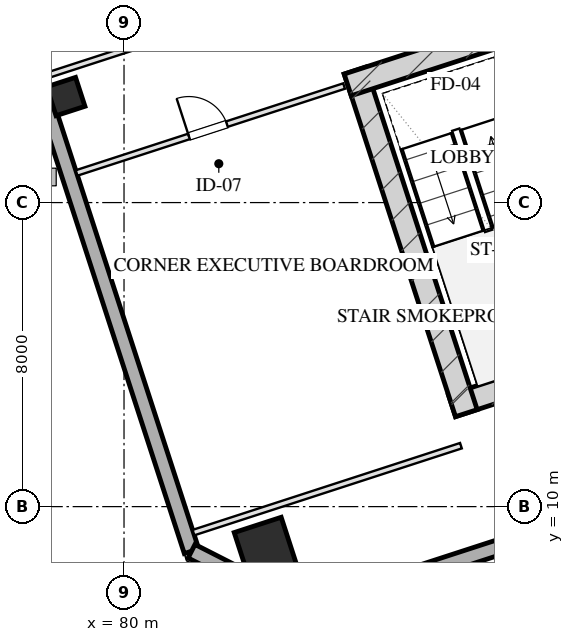
"""IFC4 building model, lengths in metres.
Left out: names, types, materials, properties, quantities, classifications, styles, units other than length and angle.
Written with IfcOpenShell. Run it as: python <this file> out.ifc"""

import sys

from ifc_helpers import new_model, si_unit, direction, frame, frame_2d, origin, origin_2d, place, context, subcontext, project, spatial, rectangle, hollow_rectangle, extrude, element, fill, save


model = new_model("IFC4")
c1 = context("Model", 3, precision=1e-05, world=origin(), true_north=direction((0.0, 1.0)))
c2 = subcontext(c1, "Body", "Model", "MODEL_VIEW")
j1 = project(units=[si_unit("LENGTHUNIT", "METRE"), si_unit("PLANEANGLEUNIT", "RADIAN")], contexts=[c1])
p1 = place(None, origin())
s1 = spatial("IfcSite", under=j1, at=p1, CompositionType="ELEMENT")
p2 = place(p1, origin())
s2 = spatial("IfcBuilding", under=s1, at=p2, CompositionType="ELEMENT")
p3 = place(p2, frame((0.0, 0.0, 163.3)))
s3 = spatial("IfcBuildingStorey", under=s2, at=p3, CompositionType="ELEMENT", Elevation=163.3)
p4 = place(p3, frame((88.63, 12.652, 0.0), z_axis=(0.0, 0.0, 1.0), x_axis=(0.95105714907, 0.309015046886, 0.0)))
e1 = element("IfcWall", 1, at=p4, inside=s3, PredefinedType="SHEAR", context=c2, shape_type="SweptSolid", body=[
    extrude(rectangle(XDim=16.4, YDim=0.6, at=frame_2d((8.2, 0.0))), origin(), (0.0, 0.0, 1.0), 3.45),
])
p5 = place(p3, frame((86.078, 21.475, 0.0), z_axis=(0.0, 0.0, 1.0), x_axis=(0.309017938678, -0.951056209472, 0.0)))
e2 = element("IfcWall", 2, at=p5, inside=s3, PredefinedType="SHEAR", context=c2, shape_type="SweptSolid", body=[
    extrude(rectangle(XDim=9.48, YDim=0.6, at=frame_2d((4.74, 0.0))), origin(), (0.0, 0.0, 1.0), 3.45),
])
p6 = place(p3, frame((85.886, 21.097, 0.0), z_axis=(0.0, 0.0, 1.0), x_axis=(0.951068073652, 0.308981422225, 0.0)))
e3 = element("IfcWall", 3, at=p6, inside=s3, PredefinedType="SHEAR", context=c2, shape_type="SweptSolid", body=[
    extrude(rectangle(XDim=4.22, YDim=0.6, at=frame_2d((2.11, 0.0))), origin(), (0.0, 0.0, 1.0), 3.45),
])
p7 = place(p3, frame((83.719, 8.901, 0.0), z_axis=(0.0, 0.0, 1.0), x_axis=(0.951056516295, 0.309016994375, 0.0)))
e4 = element("IfcColumn", 4, at=p7, inside=s3, PredefinedType="COLUMN", context=c2, shape_type="SweptSolid", body=[
    extrude(hollow_rectangle(XDim=1.3, YDim=1.3, WallThickness=0.045, at=origin_2d()), origin(), (0.0, 0.0, 1.0), 3.451),
])
p8 = place(p3, frame((78.468, 20.79, 0.0), z_axis=(0.0, 0.0, 1.0), x_axis=(0.951056516295, 0.309016994375, 0.0)))
e5 = element("IfcColumn", 5, at=p8, inside=s3, PredefinedType="COLUMN", context=c2, shape_type="SweptSolid", body=[
    extrude(hollow_rectangle(XDim=0.8, YDim=0.8, WallThickness=0.028, at=origin_2d()), origin(), (0.0, 0.0, 1.0), 3.451),
])
p9 = place(p3, frame((81.776, 8.827, 0.0), z_axis=(0.0, 0.0, 1.0), x_axis=(-0.309014228706, 0.951057414911, 0.0)))
e6 = element("IfcWall", 6, at=p9, inside=s3, PredefinedType="SOLIDWALL", context=c2, shape_type="SweptSolid", body=[
    extrude(rectangle(XDim=42.8, YDim=0.4, at=frame_2d((21.4, 0.0))), origin(), (0.0, 0.0, 1.0), 2.61),
])
p10 = place(p9, frame((23.45, 0.0, 0.0)))
e7 = element("IfcOpeningElement", 7, at=p10, cuts=e6, PredefinedType="OPENING", context=c2, shape_type="SweptSolid", body=[
    extrude(rectangle(XDim=1.1, YDim=2.15, at=frame_2d((0.55, 1.075))), frame((0.0, 0.21, 0.0), z_axis=(0.0, -1.0, 0.0), x_axis=(1.0, 0.0, 0.0)), (0.0, 0.0, 1.0), 0.42),
])
p11 = place(p3, frame((109.908, 15.444, 0.0), z_axis=(0.0, 0.0, 1.0), x_axis=(-0.951057580055, -0.30901372044, 0.0)))
e8 = element("IfcWall", 8, at=p11, inside=s3, PredefinedType="SOLIDWALL", context=c2, shape_type="SweptSolid", body=[
    extrude(rectangle(XDim=26.4, YDim=0.4, at=frame_2d((13.2, 0.0))), origin(), (0.0, 0.0, 1.0), 2.61),
])
p12 = place(p3, frame((84.801, 7.286, 0.0), z_axis=(0.0, 0.0, 1.0), x_axis=(-0.891020832027, 0.453962417932, 0.0)))
e9 = element("IfcWall", 9, at=p12, inside=s3, PredefinedType="SOLIDWALL", context=c2, shape_type="SweptSolid", body=[
    extrude(rectangle(XDim=3.394, YDim=0.4, at=frame_2d((1.697, 0.0))), origin(), (0.0, 0.0, 1.0), 2.61),
])
p13 = place(p3, frame((81.828, 9.316, 0.0), z_axis=(0.0, 0.0, 1.0), x_axis=(0.95105128112, 0.309033106124, 0.0)))
e10 = element("IfcWall", 10, at=p13, inside=s3, PredefinedType="PARTITIONING", context=c2, shape_type="SweptSolid", body=[
    extrude(rectangle(XDim=7.4, YDim=0.15, at=frame_2d((3.7, 0.0))), origin(), (0.0, 0.0, 1.0), 3.175),
])
p14 = place(p3, frame((78.753, 18.78, 0.0), z_axis=(0.0, 0.0, 1.0), x_axis=(0.951060977215, 0.309003264738, 0.0)))
e11 = element("IfcWall", 11, at=p14, inside=s3, PredefinedType="PARTITIONING", context=c2, shape_type="SweptSolid", body=[
    extrude(rectangle(XDim=7.4, YDim=0.15, at=frame_2d((3.7, 0.0))), origin(), (0.0, 0.0, 1.0), 3.175),
])
p15 = place(p14, frame((3.108, 0.0, 0.0)))
e12 = element("IfcOpeningElement", 12, at=p15, cuts=e11, PredefinedType="OPENING", context=c2, shape_type="SweptSolid", body=[
    extrude(rectangle(XDim=1.05, YDim=2.05, at=frame_2d((0.525, 1.025))), frame((0.0, 0.085, 0.0), z_axis=(0.0, -1.0, 0.0), x_axis=(1.0, 0.0, 0.0)), (0.0, 0.0, 1.0), 0.17),
])
p16 = place(p3, frame((77.925, 21.328, 0.0), z_axis=(0.0, 0.0, 1.0), x_axis=(0.951061887302, 0.309000463626, 0.0)))
e13 = element("IfcWall", 13, at=p16, inside=s3, PredefinedType="PARTITIONING", context=c2, shape_type="SweptSolid", body=[
    extrude(rectangle(XDim=6.9, YDim=0.15, at=frame_2d((3.45, 0.0))), origin(), (0.0, 0.0, 1.0), 3.175),
])
p17 = place(p15, origin())
e14 = element("IfcDoor", 14, at=p17, inside=s3, OperationType="SINGLE_SWING_LEFT", PredefinedType="DOOR", context=c2, shape_type="SweptSolid", body=[
    extrude(rectangle(XDim=1.05, YDim=2.05, at=frame_2d((0.525, 1.025))), frame((0.0, 0.025, 0.0), z_axis=(0.0, -1.0, 0.0), x_axis=(1.0, 0.0, 0.0)), (0.0, 0.0, 1.0), 0.05),
])
fill(e12, e14)
save(model, sys.argv[1])
